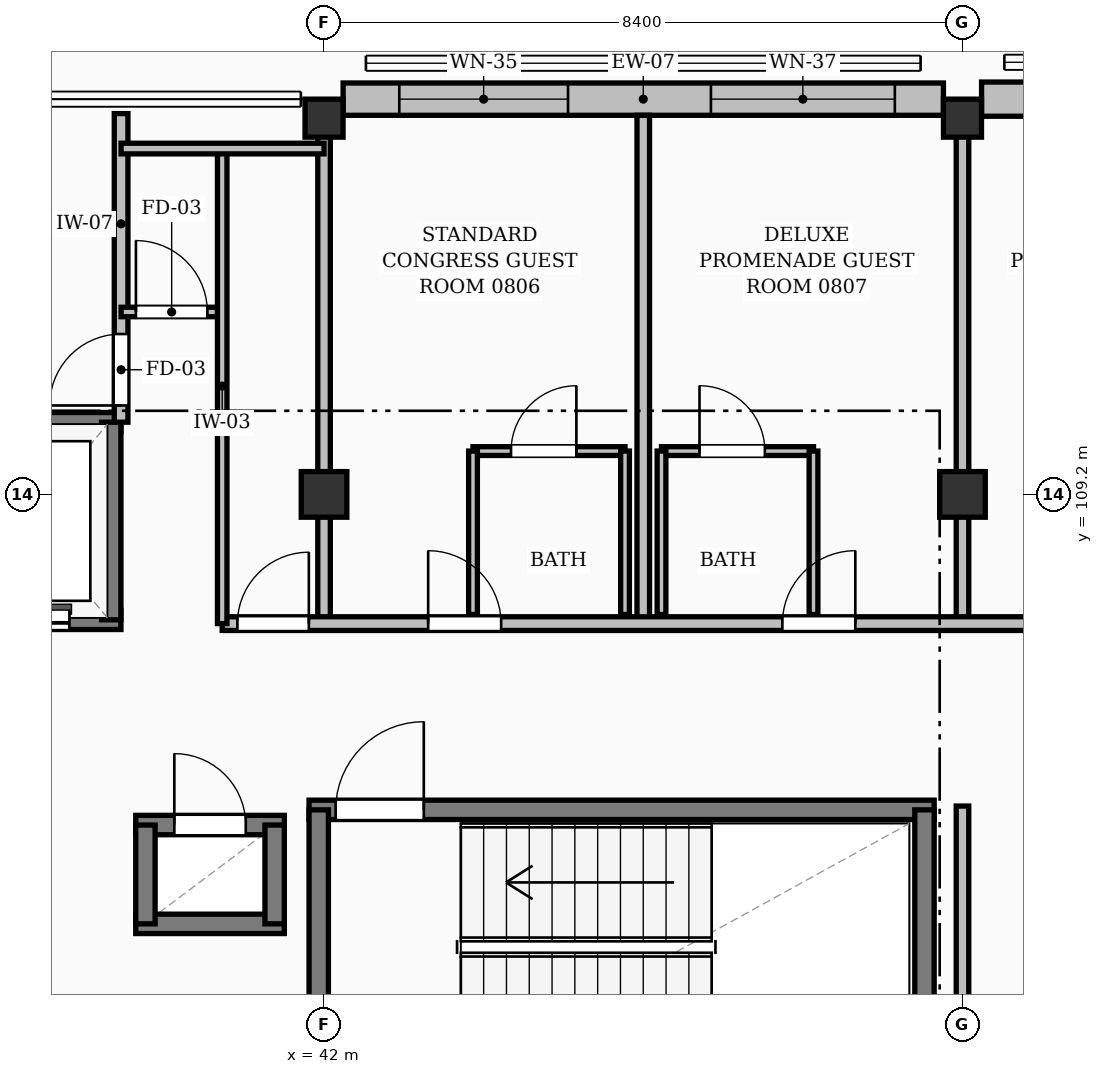
"""IFC4 building model, lengths in metres.
Left out: names, types, materials, properties, quantities, classifications, styles, units other than length and angle.
Written with IfcOpenShell. Run it as: python <this file> out.ifc"""

import sys

from ifc_helpers import new_model, si_unit, direction, frame, frame_2d, origin, origin_2d, place, context, subcontext, project, spatial, rectangle, extrude, element, fill, save


model = new_model("IFC4")
c1 = context("Model", 3, precision=1e-05, world=origin(), true_north=direction((0.0, 1.0)))
c2 = subcontext(c1, "Body", "Model", "MODEL_VIEW")
j1 = project(units=[si_unit("LENGTHUNIT", "METRE"), si_unit("PLANEANGLEUNIT", "RADIAN")], contexts=[c1])
p1 = place(None, origin())
s1 = spatial("IfcSite", under=j1, at=p1, CompositionType="ELEMENT")
p2 = place(p1, origin())
s2 = spatial("IfcBuilding", under=s1, at=p2, CompositionType="ELEMENT")
p3 = place(p2, frame((0.0, 0.0, 28.56)))
s3 = spatial("IfcBuildingStorey", under=s2, at=p3, CompositionType="ELEMENT", Elevation=28.56)
p4 = place(p3, frame((42.0, 109.2, 0.0), z_axis=(0.0, 0.0, 1.0), x_axis=(1.0, 0.0, 0.0)))
e1 = element("IfcColumn", 1, at=p4, inside=s3, PredefinedType="COLUMN", context=c2, shape_type="SweptSolid", body=[
    extrude(rectangle(XDim=0.6, YDim=0.6, at=origin_2d()), origin(), (0.0, 0.0, 1.0), 3.36),
])
p5 = place(p3, frame((42.0, 114.15, -0.315), z_axis=(0.0, 0.0, 1.0), x_axis=(1.0, 0.0, 0.0)))
e2 = element("IfcColumn", 2, at=p5, inside=s3, PredefinedType="COLUMN", context=c2, shape_type="SweptSolid", body=[
    extrude(rectangle(XDim=0.5, YDim=0.5, at=origin_2d()), origin(), (0.0, 0.0, 1.0), 3.675),
])
p6 = place(p3, frame((50.4, 109.2, 0.0), z_axis=(0.0, 0.0, 1.0), x_axis=(1.0, 0.0, 0.0)))
e3 = element("IfcColumn", 3, at=p6, inside=s3, PredefinedType="COLUMN", context=c2, shape_type="SweptSolid", body=[
    extrude(rectangle(XDim=0.6, YDim=0.6, at=origin_2d()), origin(), (0.0, 0.0, 1.0), 3.36),
])
p7 = place(p3, frame((50.4, 114.15, -0.315), z_axis=(0.0, 0.0, 1.0), x_axis=(1.0, 0.0, 0.0)))
e4 = element("IfcColumn", 4, at=p7, inside=s3, PredefinedType="COLUMN", context=c2, shape_type="SweptSolid", body=[
    extrude(rectangle(XDim=0.5, YDim=0.5, at=origin_2d()), origin(), (0.0, 0.0, 1.0), 3.675),
])
p8 = place(p3, frame((42.251, 114.4, 0.0), z_axis=(0.0, 0.0, 1.0), x_axis=(1.0, 0.0, 0.0)))
e5 = element("IfcWall", 5, at=p8, inside=s3, PredefinedType="SOLIDWALL", context=c2, shape_type="SweptSolid", body=[
    extrude(rectangle(XDim=7.898, YDim=0.425, at=frame_2d((3.949, 0.0))), origin(), (0.0, 0.0, 1.0), 2.494),
])
p9 = place(p8, frame((0.739, 0.0, 0.25)))
e6 = element("IfcOpeningElement", 6, at=p9, cuts=e5, PredefinedType="OPENING", context=c2, shape_type="SweptSolid", body=[
    extrude(rectangle(XDim=2.22, YDim=1.9, at=frame_2d((1.11, 0.95))), frame((0.0, 0.223, 0.0), z_axis=(0.0, -1.0, 0.0), x_axis=(1.0, 0.0, 0.0)), (0.0, 0.0, 1.0), 0.445),
])
p10 = place(p8, frame((4.839, 0.0, 0.25)))
e7 = element("IfcOpeningElement", 7, at=p10, cuts=e5, PredefinedType="OPENING", context=c2, shape_type="SweptSolid", body=[
    extrude(rectangle(XDim=2.42, YDim=1.9, at=frame_2d((1.21, 0.95))), frame((0.0, 0.223, 0.0), z_axis=(0.0, -1.0, 0.0), x_axis=(1.0, 0.0, 0.0)), (0.0, 0.0, 1.0), 0.445),
])
p11 = place(p3, frame((50.651, 114.4, 0.0), z_axis=(0.0, 0.0, 1.0), x_axis=(1.0, 0.0, 0.0)))
e8 = element("IfcWall", 8, at=p11, inside=s3, PredefinedType="SOLIDWALL", context=c2, shape_type="SweptSolid", body=[
    extrude(rectangle(XDim=7.898, YDim=0.45, at=frame_2d((3.949, 0.0))), origin(), (0.0, 0.0, 1.0), 2.494),
])
p12 = place(p11, frame((0.639, 0.0, 0.25)))
e9 = element("IfcOpeningElement", 9, at=p12, cuts=e8, PredefinedType="OPENING", context=c2, shape_type="SweptSolid", body=[
    extrude(rectangle(XDim=2.42, YDim=1.9, at=frame_2d((1.21, 0.95))), frame((0.0, 0.235, 0.0), z_axis=(0.0, -1.0, 0.0), x_axis=(1.0, 0.0, 0.0)), (0.0, 0.0, 1.0), 0.47),
])
p13 = place(p11, frame((4.859, 0.0, 0.25)))
e10 = element("IfcOpeningElement", 10, at=p13, cuts=e8, PredefinedType="OPENING", context=c2, shape_type="SweptSolid", body=[
    extrude(rectangle(XDim=2.38, YDim=2.0, at=frame_2d((1.19, 1.0))), frame((0.0, 0.235, 0.0), z_axis=(0.0, -1.0, 0.0), x_axis=(1.0, 0.0, 0.0)), (0.0, 0.0, 1.0), 0.47),
])
p14 = place(p3, frame((41.802, 105.05, 0.0), z_axis=(0.0, 0.0, 1.0), x_axis=(1.0, 0.0, 0.0)))
e11 = element("IfcWall", 11, at=p14, inside=s3, PredefinedType="SOLIDWALL", context=c2, shape_type="SweptSolid", body=[
    extrude(rectangle(XDim=8.225, YDim=0.255, at=frame_2d((4.113, 0.0))), origin(), (0.0, 0.0, 1.0), 3.12),
])
p15 = place(p14, frame((0.35, 0.0, 0.0)))
e12 = element("IfcOpeningElement", 12, at=p15, cuts=e11, PredefinedType="OPENING", context=c2, shape_type="SweptSolid", body=[
    extrude(rectangle(XDim=1.16, YDim=2.15, at=frame_2d((0.58, 1.075))), frame((0.0, 0.137, 0.0), z_axis=(0.0, -1.0, 0.0), x_axis=(1.0, 0.0, 0.0)), (0.0, 0.0, 1.0), 0.275),
])
for number, where, z_axis, x_axis in (
    (13, (41.93, 101.42, 0.0), (0.0, 0.0, 1.0), (0.0, 1.0, 0.0)),
    (14, (49.9, 101.42, 0.0), (0.0, 0.0, 1.0), (0.0, 1.0, 0.0)),
):
    element("IfcWall", number, at=place(p3, frame(where, z_axis=z_axis, x_axis=x_axis)), inside=s3, PredefinedType="SOLIDWALL", context=c2, shape_type="SweptSolid", body=[
        extrude(rectangle(XDim=3.63, YDim=0.255, at=frame_2d((1.815, 0.0))), origin(), (0.0, 0.0, 1.0), 3.12),
    ])
p16 = place(p3, frame((36.873, 107.55, 0.0), z_axis=(0.0, 0.0, 1.0), x_axis=(1.0, 0.0, 0.0)))
e15 = element("IfcWall", 15, at=p16, inside=s3, PredefinedType="SOLIDWALL", context=c2, shape_type="SweptSolid", body=[
    extrude(rectangle(XDim=2.455, YDim=0.255, at=frame_2d((1.228, 0.0))), origin(), (0.0, 0.0, 1.0), 3.12),
])
p17 = place(p16, frame((0.677, 0.0, 0.0)))
e16 = element("IfcOpeningElement", 16, at=p17, cuts=e15, PredefinedType="OPENING", context=c2, shape_type="SweptSolid", body=[
    extrude(rectangle(XDim=1.1, YDim=2.15, at=frame_2d((0.55, 1.075))), frame((0.0, 0.137, 0.0), z_axis=(0.0, -1.0, 0.0), x_axis=(1.0, 0.0, 0.0)), (0.0, 0.0, 1.0), 0.275),
])
p18 = place(p3, frame((36.873, 110.15, 0.0), z_axis=(0.0, 0.0, 1.0), x_axis=(1.0, 0.0, 0.0)))
e17 = element("IfcWall", 17, at=p18, inside=s3, PredefinedType="SOLIDWALL", context=c2, shape_type="SweptSolid", body=[
    extrude(rectangle(XDim=2.455, YDim=0.255, at=frame_2d((1.228, 0.0))), origin(), (0.0, 0.0, 1.0), 3.12),
])
p19 = place(p3, frame((39.2, 107.55, 0.0), z_axis=(0.0, 0.0, 1.0), x_axis=(0.0, 1.0, 0.0)))
e18 = element("IfcWall", 18, at=p19, inside=s3, PredefinedType="SOLIDWALL", context=c2, shape_type="SweptSolid", body=[
    extrude(rectangle(XDim=2.6, YDim=0.255, at=frame_2d((1.3, 0.0))), origin(), (0.0, 0.0, 1.0), 3.12),
])
p20 = place(p3, frame((39.522, 103.55, 0.0), z_axis=(0.0, 0.0, 1.0), x_axis=(1.0, 0.0, 0.0)))
e19 = element("IfcWall", 19, at=p20, inside=s3, PredefinedType="SOLIDWALL", context=c2, shape_type="SweptSolid", body=[
    extrude(rectangle(XDim=1.955, YDim=0.255, at=frame_2d((0.978, 0.0))), origin(), (0.0, 0.0, 1.0), 3.12),
])
p21 = place(p3, frame((39.522, 104.85, 0.0), z_axis=(0.0, 0.0, 1.0), x_axis=(1.0, 0.0, 0.0)))
e20 = element("IfcWall", 20, at=p21, inside=s3, PredefinedType="SOLIDWALL", context=c2, shape_type="SweptSolid", body=[
    extrude(rectangle(XDim=1.955, YDim=0.255, at=frame_2d((0.978, 0.0))), origin(), (0.0, 0.0, 1.0), 3.12),
])
p22 = place(p21, frame((0.508, 0.0, 0.0)))
e21 = element("IfcOpeningElement", 21, at=p22, cuts=e20, PredefinedType="OPENING", context=c2, shape_type="SweptSolid", body=[
    extrude(rectangle(XDim=0.94, YDim=2.1, at=frame_2d((0.47, 1.05))), frame((0.0, 0.137, 0.0), z_axis=(0.0, -1.0, 0.0), x_axis=(1.0, 0.0, 0.0)), (0.0, 0.0, 1.0), 0.275),
])
for number, where, z_axis, x_axis in (
    (22, (39.65, 103.55, 0.0), (0.0, 0.0, 1.0), (0.0, 1.0, 0.0)),
    (23, (41.35, 103.55, 0.0), (0.0, 0.0, 1.0), (0.0, 1.0, 0.0)),
):
    element("IfcWall", number, at=place(p3, frame(where, z_axis=z_axis, x_axis=x_axis)), inside=s3, PredefinedType="SOLIDWALL", context=c2, shape_type="SweptSolid", body=[
        extrude(rectangle(XDim=1.3, YDim=0.255, at=frame_2d((0.65, 0.0))), origin(), (0.0, 0.0, 1.0), 3.12),
    ])
p23 = place(p3, frame((43.96, 109.77, 0.0), z_axis=(0.0, 0.0, 1.0), x_axis=(1.0, 0.0, 0.0)))
e24 = element("IfcWall", 24, at=p23, inside=s3, PredefinedType="PARTITIONING", context=c2, shape_type="SweptSolid", body=[
    extrude(rectangle(XDim=2.0, YDim=0.115, at=frame_2d((1.0, 0.0))), origin(), (0.0, 0.0, 1.0), 3.12),
])
p24 = place(p23, frame((0.5, 0.0, 0.0)))
e25 = element("IfcOpeningElement", 25, at=p24, cuts=e24, PredefinedType="OPENING", context=c2, shape_type="SweptSolid", body=[
    extrude(rectangle(XDim=0.86, YDim=2.05, at=frame_2d((0.43, 1.025))), frame((0.0, 0.067, 0.0), z_axis=(0.0, -1.0, 0.0), x_axis=(1.0, 0.0, 0.0)), (0.0, 0.0, 1.0), 0.135),
])
p25 = place(p3, frame((43.96, 107.62, 0.0), z_axis=(0.0, 0.0, 1.0), x_axis=(0.0, 1.0, 0.0)))
e26 = element("IfcWall", 26, at=p25, inside=s3, PredefinedType="PARTITIONING", context=c2, shape_type="SweptSolid", body=[
    extrude(rectangle(XDim=2.15, YDim=0.115, at=frame_2d((1.075, 0.0))), origin(), (0.0, 0.0, 1.0), 2.642),
])
p26 = place(p3, frame((45.96, 107.62, 0.0), z_axis=(0.0, 0.0, 1.0), x_axis=(0.0, 1.0, 0.0)))
e27 = element("IfcWall", 27, at=p26, inside=s3, PredefinedType="PARTITIONING", context=c2, shape_type="SweptSolid", body=[
    extrude(rectangle(XDim=2.15, YDim=0.115, at=frame_2d((1.075, 0.0))), origin(), (0.0, 0.0, 1.0), 3.12),
])
p27 = place(p3, frame((46.44, 109.77, 0.0), z_axis=(0.0, 0.0, 1.0), x_axis=(1.0, 0.0, 0.0)))
e28 = element("IfcWall", 28, at=p27, inside=s3, PredefinedType="PARTITIONING", context=c2, shape_type="SweptSolid", body=[
    extrude(rectangle(XDim=2.0, YDim=0.115, at=frame_2d((1.0, 0.0))), origin(), (0.0, 0.0, 1.0), 3.12),
])
p28 = place(p27, frame((0.5, 0.0, 0.0)))
e29 = element("IfcOpeningElement", 29, at=p28, cuts=e28, PredefinedType="OPENING", context=c2, shape_type="SweptSolid", body=[
    extrude(rectangle(XDim=0.86, YDim=2.05, at=frame_2d((0.43, 1.025))), frame((0.0, 0.067, 0.0), z_axis=(0.0, -1.0, 0.0), x_axis=(1.0, 0.0, 0.0)), (0.0, 0.0, 1.0), 0.135),
])
p29 = place(p3, frame((46.44, 107.62, 0.0), z_axis=(0.0, 0.0, 1.0), x_axis=(0.0, 1.0, 0.0)))
e30 = element("IfcWall", 30, at=p29, inside=s3, PredefinedType="PARTITIONING", context=c2, shape_type="SweptSolid", body=[
    extrude(rectangle(XDim=2.15, YDim=0.115, at=frame_2d((1.075, 0.0))), origin(), (0.0, 0.0, 1.0), 3.12),
])
p30 = place(p3, frame((48.44, 107.62, 0.0), z_axis=(0.0, 0.0, 1.0), x_axis=(0.0, 1.0, 0.0)))
e31 = element("IfcWall", 31, at=p30, inside=s3, PredefinedType="PARTITIONING", context=c2, shape_type="SweptSolid", body=[
    extrude(rectangle(XDim=2.15, YDim=0.115, at=frame_2d((1.075, 0.0))), origin(), (0.0, 0.0, 1.0), 2.642),
])
p31 = place(p3, frame((46.2, 107.5, 0.0), z_axis=(0.0, 0.0, 1.0), x_axis=(0.0, 1.0, 0.0)))
e32 = element("IfcWall", 32, at=p31, inside=s3, PredefinedType="PARTITIONING", context=c2, shape_type="SweptSolid", body=[
    extrude(rectangle(XDim=6.688, YDim=0.165, at=frame_2d((3.344, 0.0))), origin(), (0.0, 0.0, 1.0), 3.12),
])
for number, where, z_axis, x_axis in (
    (33, (42.0, 107.5, 0.0), (0.0, 0.0, 1.0), (0.0, 1.0, 0.0)),
    (34, (50.4, 107.5, 0.0), (0.0, 0.0, 1.0), (0.0, 1.0, 0.0)),
):
    element("IfcWall", number, at=place(p3, frame(where, z_axis=z_axis, x_axis=x_axis)), inside=s3, PredefinedType="PARTITIONING", context=c2, shape_type="SweptSolid", body=[
        extrude(rectangle(XDim=6.55, YDim=0.165, at=frame_2d((3.275, 0.0))), origin(), (0.0, 0.0, 1.0), 2.41),
    ])
p32 = place(p3, frame((40.66, 107.5, 0.0), z_axis=(0.0, 0.0, 1.0), x_axis=(1.0, 0.0, 0.0)))
e35 = element("IfcWall", 35, at=p32, inside=s3, PredefinedType="PARTITIONING", context=c2, shape_type="SweptSolid", body=[
    extrude(rectangle(XDim=26.378, YDim=0.18, at=frame_2d((13.189, 0.0))), origin(), (0.0, 0.0, 1.0), 3.12),
])
p33 = place(p32, frame((0.2, 0.0, 0.0)))
e36 = element("IfcOpeningElement", 36, at=p33, cuts=e35, PredefinedType="OPENING", context=c2, shape_type="SweptSolid", body=[
    extrude(rectangle(XDim=0.94, YDim=2.1, at=frame_2d((0.47, 1.05))), frame((0.0, 0.1, 0.0), z_axis=(0.0, -1.0, 0.0), x_axis=(1.0, 0.0, 0.0)), (0.0, 0.0, 1.0), 0.2),
])
p34 = place(p32, frame((2.71, 0.0, 0.0)))
e37 = element("IfcOpeningElement", 37, at=p34, cuts=e35, PredefinedType="OPENING", context=c2, shape_type="SweptSolid", body=[
    extrude(rectangle(XDim=0.96, YDim=2.15, at=frame_2d((0.48, 1.075))), frame((0.0, 0.1, 0.0), z_axis=(0.0, -1.0, 0.0), x_axis=(1.0, 0.0, 0.0)), (0.0, 0.0, 1.0), 0.2),
])
p35 = place(p32, frame((7.37, 0.0, 0.0)))
e38 = element("IfcOpeningElement", 38, at=p35, cuts=e35, PredefinedType="OPENING", context=c2, shape_type="SweptSolid", body=[
    extrude(rectangle(XDim=0.96, YDim=2.15, at=frame_2d((0.48, 1.075))), frame((0.0, 0.1, 0.0), z_axis=(0.0, -1.0, 0.0), x_axis=(1.0, 0.0, 0.0)), (0.0, 0.0, 1.0), 0.2),
])
p36 = place(p32, frame((11.11, 0.0, 0.0)))
e39 = element("IfcOpeningElement", 39, at=p36, cuts=e35, PredefinedType="OPENING", context=c2, shape_type="SweptSolid", body=[
    extrude(rectangle(XDim=0.96, YDim=2.15, at=frame_2d((0.48, 1.075))), frame((0.0, 0.1, 0.0), z_axis=(0.0, -1.0, 0.0), x_axis=(1.0, 0.0, 0.0)), (0.0, 0.0, 1.0), 0.2),
])
p37 = place(p32, frame((15.77, 0.0, 0.0)))
e40 = element("IfcOpeningElement", 40, at=p37, cuts=e35, PredefinedType="OPENING", context=c2, shape_type="SweptSolid", body=[
    extrude(rectangle(XDim=0.96, YDim=2.15, at=frame_2d((0.48, 1.075))), frame((0.0, 0.1, 0.0), z_axis=(0.0, -1.0, 0.0), x_axis=(1.0, 0.0, 0.0)), (0.0, 0.0, 1.0), 0.2),
])
p38 = place(p32, frame((19.51, 0.0, 0.0)))
e41 = element("IfcOpeningElement", 41, at=p38, cuts=e35, PredefinedType="OPENING", context=c2, shape_type="SweptSolid", body=[
    extrude(rectangle(XDim=0.96, YDim=2.15, at=frame_2d((0.48, 1.075))), frame((0.0, 0.1, 0.0), z_axis=(0.0, -1.0, 0.0), x_axis=(1.0, 0.0, 0.0)), (0.0, 0.0, 1.0), 0.2),
])
p39 = place(p32, frame((24.17, 0.0, 0.0)))
e42 = element("IfcOpeningElement", 42, at=p39, cuts=e35, PredefinedType="OPENING", context=c2, shape_type="SweptSolid", body=[
    extrude(rectangle(XDim=0.96, YDim=2.15, at=frame_2d((0.48, 1.075))), frame((0.0, 0.1, 0.0), z_axis=(0.0, -1.0, 0.0), x_axis=(1.0, 0.0, 0.0)), (0.0, 0.0, 1.0), 0.2),
])
p40 = place(p3, frame((39.33, 110.15, 0.0), z_axis=(0.0, 0.0, 1.0), x_axis=(0.0, 1.0, 0.0)))
e43 = element("IfcWall", 43, at=p40, inside=s3, PredefinedType="PARTITIONING", context=c2, shape_type="SweptSolid", body=[
    extrude(rectangle(XDim=4.06, YDim=0.18, at=frame_2d((2.03, 0.0))), origin(), (0.0, 0.0, 1.0), 3.12),
])
p41 = place(p40, frame((0.22, 0.0, 0.0)))
e44 = element("IfcOpeningElement", 44, at=p41, cuts=e43, PredefinedType="OPENING", context=c2, shape_type="SweptSolid", body=[
    extrude(rectangle(XDim=0.94, YDim=2.1, at=frame_2d((0.47, 1.05))), frame((0.0, 0.1, 0.0), z_axis=(0.0, -1.0, 0.0), x_axis=(1.0, 0.0, 0.0)), (0.0, 0.0, 1.0), 0.2),
])
p42 = place(p3, frame((39.33, 111.6, 0.0), z_axis=(0.0, 0.0, 1.0), x_axis=(1.0, 0.0, 0.0)))
e45 = element("IfcWall", 45, at=p42, inside=s3, PredefinedType="PARTITIONING", context=c2, shape_type="SweptSolid", body=[
    extrude(rectangle(XDim=1.33, YDim=0.125, at=frame_2d((0.665, 0.0))), origin(), (0.0, 0.0, 1.0), 3.12),
])
p43 = place(p42, frame((0.195, 0.0, 0.0)))
e46 = element("IfcOpeningElement", 46, at=p43, cuts=e45, PredefinedType="OPENING", context=c2, shape_type="SweptSolid", body=[
    extrude(rectangle(XDim=0.94, YDim=2.1, at=frame_2d((0.47, 1.05))), frame((0.0, 0.073, 0.0), z_axis=(0.0, -1.0, 0.0), x_axis=(1.0, 0.0, 0.0)), (0.0, 0.0, 1.0), 0.145),
])
p44 = place(p3, frame((40.66, 107.5, 0.0), z_axis=(0.0, 0.0, 1.0), x_axis=(0.0, 1.0, 0.0)))
e47 = element("IfcWall", 47, at=p44, inside=s3, PredefinedType="PARTITIONING", context=c2, shape_type="SweptSolid", body=[
    extrude(rectangle(XDim=6.25, YDim=0.125, at=frame_2d((3.125, 0.0))), origin(), (0.0, 0.0, 1.0), 3.12),
])
p45 = place(p3, frame((39.33, 113.75, 0.0), z_axis=(0.0, 0.0, 1.0), x_axis=(1.0, 0.0, 0.0)))
e48 = element("IfcWall", 48, at=p45, inside=s3, PredefinedType="PARTITIONING", context=c2, shape_type="SweptSolid", body=[
    extrude(rectangle(XDim=2.67, YDim=0.14, at=frame_2d((1.335, 0.0))), origin(), (0.0, 0.0, 1.0), 3.12),
])
p46 = place(p3, frame((50.4, 92.75, 0.0), z_axis=(0.0, 0.0, 1.0), x_axis=(0.0, 1.0, 0.0)))
e49 = element("IfcWall", 49, at=p46, inside=s3, PredefinedType="PARTITIONING", context=c2, shape_type="SweptSolid", body=[
    extrude(rectangle(XDim=12.35, YDim=0.165, at=frame_2d((6.175, 0.0))), origin(), (0.0, 0.0, 1.0), 2.455),
])
p47 = place(p9, origin())
e50 = element("IfcWindow", 50, at=p47, inside=s3, PartitioningType="DOUBLE_PANEL_VERTICAL", PredefinedType="WINDOW", context=c2, shape_type="SweptSolid", body=[
    extrude(rectangle(XDim=2.22, YDim=1.9, at=frame_2d((1.11, 0.95))), frame((0.0, 0.03, 0.0), z_axis=(0.0, -1.0, 0.0), x_axis=(1.0, 0.0, 0.0)), (0.0, 0.0, 1.0), 0.06),
])
fill(e6, e50)
p48 = place(p10, origin())
e51 = element("IfcWindow", 51, at=p48, inside=s3, PartitioningType="DOUBLE_PANEL_VERTICAL", PredefinedType="WINDOW", context=c2, shape_type="SweptSolid", body=[
    extrude(rectangle(XDim=2.42, YDim=1.9, at=frame_2d((1.21, 0.95))), frame((0.0, 0.03, 0.0), z_axis=(0.0, -1.0, 0.0), x_axis=(1.0, 0.0, 0.0)), (0.0, 0.0, 1.0), 0.06),
])
fill(e7, e51)
p49 = place(p15, origin())
e52 = element("IfcDoor", 52, at=p49, inside=s3, OperationType="SINGLE_SWING_RIGHT", PredefinedType="DOOR", context=c2, shape_type="SweptSolid", body=[
    extrude(rectangle(XDim=1.16, YDim=2.15, at=frame_2d((0.58, 1.075))), frame((0.0, 0.025, 0.0), z_axis=(0.0, -1.0, 0.0), x_axis=(1.0, 0.0, 0.0)), (0.0, 0.0, 1.0), 0.05),
])
fill(e12, e52)
p50 = place(p17, origin())
e53 = element("IfcDoor", 53, at=p50, inside=s3, OperationType="DOUBLE_DOOR_SLIDING", PredefinedType="DOOR", context=c2, shape_type="SweptSolid", body=[
    extrude(rectangle(XDim=1.1, YDim=2.15, at=frame_2d((0.55, 1.075))), frame((0.0, 0.025, 0.0), z_axis=(0.0, -1.0, 0.0), x_axis=(1.0, 0.0, 0.0)), (0.0, 0.0, 1.0), 0.05),
])
fill(e16, e53)
p51 = place(p22, origin())
e54 = element("IfcDoor", 54, at=p51, inside=s3, OperationType="SINGLE_SWING_LEFT", PredefinedType="DOOR", context=c2, shape_type="SweptSolid", body=[
    extrude(rectangle(XDim=0.94, YDim=2.1, at=frame_2d((0.47, 1.05))), frame((0.0, 0.025, 0.0), z_axis=(0.0, -1.0, 0.0), x_axis=(1.0, 0.0, 0.0)), (0.0, 0.0, 1.0), 0.05),
])
fill(e21, e54)
p52 = place(p24, origin())
e55 = element("IfcDoor", 55, at=p52, inside=s3, OperationType="SINGLE_SWING_RIGHT", PredefinedType="DOOR", context=c2, shape_type="SweptSolid", body=[
    extrude(rectangle(XDim=0.86, YDim=2.05, at=frame_2d((0.43, 1.025))), frame((0.0, 0.025, 0.0), z_axis=(0.0, -1.0, 0.0), x_axis=(1.0, 0.0, 0.0)), (0.0, 0.0, 1.0), 0.05),
])
fill(e25, e55)
p53 = place(p28, origin())
e56 = element("IfcDoor", 56, at=p53, inside=s3, OperationType="SINGLE_SWING_LEFT", PredefinedType="DOOR", context=c2, shape_type="SweptSolid", body=[
    extrude(rectangle(XDim=0.86, YDim=2.05, at=frame_2d((0.43, 1.025))), frame((0.0, 0.025, 0.0), z_axis=(0.0, -1.0, 0.0), x_axis=(1.0, 0.0, 0.0)), (0.0, 0.0, 1.0), 0.05),
])
fill(e29, e56)
p54 = place(p33, origin())
e57 = element("IfcDoor", 57, at=p54, inside=s3, OperationType="SINGLE_SWING_RIGHT", PredefinedType="DOOR", context=c2, shape_type="SweptSolid", body=[
    extrude(rectangle(XDim=0.94, YDim=2.1, at=frame_2d((0.47, 1.05))), frame((0.0, 0.025, 0.0), z_axis=(0.0, -1.0, 0.0), x_axis=(1.0, 0.0, 0.0)), (0.0, 0.0, 1.0), 0.05),
])
fill(e36, e57)
p55 = place(p34, origin())
e58 = element("IfcDoor", 58, at=p55, inside=s3, OperationType="SINGLE_SWING_LEFT", PredefinedType="DOOR", context=c2, shape_type="SweptSolid", body=[
    extrude(rectangle(XDim=0.96, YDim=2.15, at=frame_2d((0.48, 1.075))), frame((0.0, 0.025, 0.0), z_axis=(0.0, -1.0, 0.0), x_axis=(1.0, 0.0, 0.0)), (0.0, 0.0, 1.0), 0.05),
])
fill(e37, e58)
p56 = place(p35, origin())
e59 = element("IfcDoor", 59, at=p56, inside=s3, OperationType="SINGLE_SWING_RIGHT", PredefinedType="DOOR", context=c2, shape_type="SweptSolid", body=[
    extrude(rectangle(XDim=0.96, YDim=2.15, at=frame_2d((0.48, 1.075))), frame((0.0, 0.025, 0.0), z_axis=(0.0, -1.0, 0.0), x_axis=(1.0, 0.0, 0.0)), (0.0, 0.0, 1.0), 0.05),
])
fill(e38, e59)
p57 = place(p41, origin())
e60 = element("IfcDoor", 60, at=p57, inside=s3, OperationType="SINGLE_SWING_LEFT", PredefinedType="DOOR", context=c2, shape_type="SweptSolid", body=[
    extrude(rectangle(XDim=0.94, YDim=2.1, at=frame_2d((0.47, 1.05))), frame((0.0, 0.025, 0.0), z_axis=(0.0, -1.0, 0.0), x_axis=(1.0, 0.0, 0.0)), (0.0, 0.0, 1.0), 0.05),
])
fill(e44, e60)
p58 = place(p43, origin())
e61 = element("IfcDoor", 61, at=p58, inside=s3, OperationType="SINGLE_SWING_LEFT", PredefinedType="DOOR", context=c2, shape_type="SweptSolid", body=[
    extrude(rectangle(XDim=0.94, YDim=2.1, at=frame_2d((0.47, 1.05))), frame((0.0, 0.025, 0.0), z_axis=(0.0, -1.0, 0.0), x_axis=(1.0, 0.0, 0.0)), (0.0, 0.0, 1.0), 0.05),
])
fill(e46, e61)
save(model, sys.argv[1])
